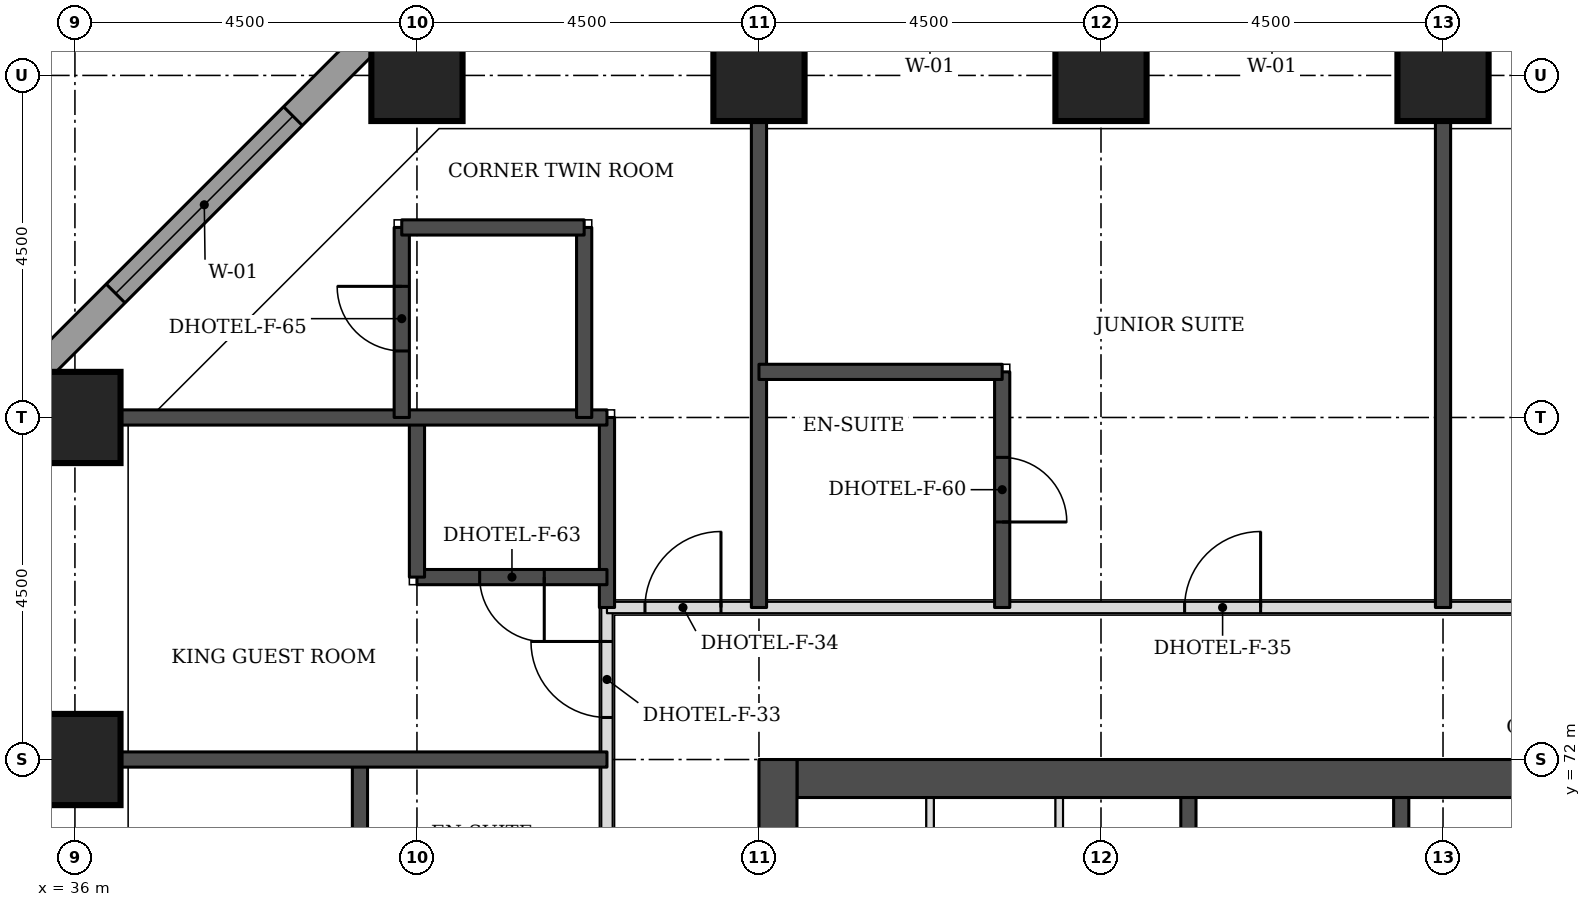
"""IFC4 building model, lengths in metres.
Left out: names, types, materials, properties, quantities, classifications, styles, units other than length and angle.
Written with IfcOpenShell. Run it as: python <this file> out.ifc"""

import sys

from ifc_helpers import new_model, si_unit, direction, frame, frame_2d, origin, origin_2d, place, context, subcontext, project, spatial, rectangle, extrude, element, fill, save


model = new_model("IFC4")
c1 = context("Model", 3, precision=1e-05, world=origin(), true_north=direction((0.0, 1.0)))
c2 = subcontext(c1, "Body", "Model", "MODEL_VIEW")
j1 = project(units=[si_unit("LENGTHUNIT", "METRE"), si_unit("PLANEANGLEUNIT", "RADIAN")], contexts=[c1])
p1 = place(None, origin())
s1 = spatial("IfcSite", under=j1, at=p1, CompositionType="ELEMENT")
p2 = place(p1, origin())
s2 = spatial("IfcBuilding", under=s1, at=p2, CompositionType="ELEMENT")
p3 = place(p2, frame((0.0, 0.0, 42.9)))
s3 = spatial("IfcBuildingStorey", under=s2, at=p3, CompositionType="ELEMENT", Elevation=42.9)
for number, where, z_axis, x_axis in (
    (1, (36.0, 72.0, 0.0), (0.0, 0.0, 1.0), (1.0, 0.0, 0.0)),
    (2, (36.0, 76.5, 0.0), (0.0, 0.0, 1.0), (1.0, 0.0, 0.0)),
    (3, (40.5, 81.0, 0.0), (0.0, 0.0, 1.0), (1.0, 0.0, 0.0)),
    (4, (45.0, 81.0, 0.0), (0.0, 0.0, 1.0), (1.0, 0.0, 0.0)),
    (5, (49.5, 81.0, 0.0), (0.0, 0.0, 1.0), (1.0, 0.0, 0.0)),
    (6, (54.0, 81.0, 0.0), (0.0, 0.0, 1.0), (1.0, 0.0, 0.0)),
):
    element("IfcColumn", number, at=place(p3, frame(where, z_axis=z_axis, x_axis=x_axis)), inside=s3, PredefinedType="COLUMN", context=c2, shape_type="SweptSolid", body=[
        extrude(rectangle(XDim=1.2, YDim=1.2, at=origin_2d()), origin(), (0.0, 0.0, 1.0), 3.3),
    ])
p4 = place(p3, frame((45.5, 71.75, 0.0), z_axis=(0.0, 0.0, 1.0), x_axis=(1.0, 0.0, 0.0)))
e7 = element("IfcWall", 7, at=p4, inside=s3, PredefinedType="SHEAR", context=c2, shape_type="SweptSolid", body=[
    extrude(rectangle(XDim=21.5, YDim=0.5, at=frame_2d((10.75, 0.0))), origin(), (0.0, 0.0, 1.0), 3.3),
])
p5 = place(p3, frame((45.25, 49.5, 0.0), z_axis=(0.0, 0.0, 1.0), x_axis=(0.0, 1.0, 0.0)))
e8 = element("IfcWall", 8, at=p5, inside=s3, PredefinedType="SHEAR", context=c2, shape_type="SweptSolid", body=[
    extrude(rectangle(XDim=22.5, YDim=0.5, at=frame_2d((11.25, 0.0))), origin(), (0.0, 0.0, 1.0), 3.3),
])
p6 = place(p5, frame((4.2, 0.0, 0.0)))
e9 = element("IfcOpeningElement", 9, at=p6, cuts=e8, PredefinedType="OPENING", context=c2, shape_type="SweptSolid", body=[
    extrude(rectangle(XDim=1.8, YDim=2.1, at=frame_2d((0.9, 1.05))), frame((0.0, 0.26, 0.0), z_axis=(0.0, -1.0, 0.0), x_axis=(1.0, 0.0, 0.0)), (0.0, 0.0, 1.0), 0.52),
])
p7 = place(p5, frame((6.9, 0.0, 0.0)))
e10 = element("IfcOpeningElement", 10, at=p7, cuts=e8, PredefinedType="OPENING", context=c2, shape_type="SweptSolid", body=[
    extrude(rectangle(XDim=1.1, YDim=2.1, at=frame_2d((0.55, 1.05))), frame((0.0, 0.26, 0.0), z_axis=(0.0, -1.0, 0.0), x_axis=(1.0, 0.0, 0.0)), (0.0, 0.0, 1.0), 0.52),
])
p8 = place(p5, frame((13.6, 0.0, 0.0)))
e11 = element("IfcOpeningElement", 11, at=p8, cuts=e8, PredefinedType="OPENING", context=c2, shape_type="SweptSolid", body=[
    extrude(rectangle(XDim=1.1, YDim=2.1, at=frame_2d((0.55, 1.05))), frame((0.0, 0.26, 0.0), z_axis=(0.0, -1.0, 0.0), x_axis=(1.0, 0.0, 0.0)), (0.0, 0.0, 1.0), 0.52),
])
p9 = place(p5, frame((16.5, 0.0, 0.0)))
e12 = element("IfcOpeningElement", 12, at=p9, cuts=e8, PredefinedType="OPENING", context=c2, shape_type="SweptSolid", body=[
    extrude(rectangle(XDim=1.8, YDim=2.1, at=frame_2d((0.9, 1.05))), frame((0.0, 0.26, 0.0), z_axis=(0.0, -1.0, 0.0), x_axis=(1.0, 0.0, 0.0)), (0.0, 0.0, 1.0), 0.52),
])
p10 = place(p3, frame((40.23, 81.826, 0.0), z_axis=(0.0, 0.0, 1.0), x_axis=(-0.707106781187, -0.707106781187, 0.0)))
e13 = element("IfcWall", 13, at=p10, inside=s3, PredefinedType="STANDARD", context=c2, shape_type="SweptSolid", body=[
    extrude(rectangle(XDim=7.151, YDim=0.35, at=frame_2d((3.576, 0.0))), origin(), (0.0, 0.0, 1.0), 3.055),
])
p11 = place(p10, frame((1.926, 0.0, 0.8)))
e14 = element("IfcOpeningElement", 14, at=p11, cuts=e13, PredefinedType="OPENING", context=c2, shape_type="SweptSolid", body=[
    extrude(rectangle(XDim=3.3, YDim=1.5, at=frame_2d((1.65, 0.75))), frame((0.0, 0.185, 0.0), z_axis=(0.0, -1.0, 0.0), x_axis=(1.0, 0.0, 0.0)), (0.0, 0.0, 1.0), 0.37),
])
p12 = place(p3, frame((43.0, 57.35, 0.0), z_axis=(0.0, 0.0, 1.0), x_axis=(0.0, 1.0, 0.0)))
e15 = element("IfcWall", 15, at=p12, inside=s3, PredefinedType="PARTITIONING", context=c2, shape_type="SweptSolid", body=[
    extrude(rectangle(XDim=16.65, YDim=0.15, at=frame_2d((8.325, 0.0))), origin(), (0.0, 0.0, 1.0), 3.08),
])
p13 = place(p12, frame((8.45, 0.0, 0.0)))
e16 = element("IfcOpeningElement", 16, at=p13, cuts=e15, PredefinedType="OPENING", context=c2, shape_type="SweptSolid", body=[
    extrude(rectangle(XDim=1.0, YDim=2.1, at=frame_2d((0.5, 1.05))), frame((0.0, 0.085, 0.0), z_axis=(0.0, -1.0, 0.0), x_axis=(1.0, 0.0, 0.0)), (0.0, 0.0, 1.0), 0.17),
])
p14 = place(p12, frame((10.6, 0.0, 0.0)))
e17 = element("IfcOpeningElement", 17, at=p14, cuts=e15, PredefinedType="OPENING", context=c2, shape_type="SweptSolid", body=[
    extrude(rectangle(XDim=1.0, YDim=2.1, at=frame_2d((0.5, 1.05))), frame((0.0, 0.085, 0.0), z_axis=(0.0, -1.0, 0.0), x_axis=(1.0, 0.0, 0.0)), (0.0, 0.0, 1.0), 0.17),
])
p15 = place(p12, frame((15.203, 0.0, 0.0)))
e18 = element("IfcOpeningElement", 18, at=p15, cuts=e15, PredefinedType="OPENING", context=c2, shape_type="SweptSolid", body=[
    extrude(rectangle(XDim=1.0, YDim=2.1, at=frame_2d((0.5, 1.05))), frame((0.0, 0.085, 0.0), z_axis=(0.0, -1.0, 0.0), x_axis=(1.0, 0.0, 0.0)), (0.0, 0.0, 1.0), 0.17),
])
p16 = place(p3, frame((43.0, 74.0, 0.0), z_axis=(0.0, 0.0, 1.0), x_axis=(1.0, 0.0, 0.0)))
e19 = element("IfcWall", 19, at=p16, inside=s3, PredefinedType="PARTITIONING", context=c2, shape_type="SweptSolid", body=[
    extrude(rectangle(XDim=26.5, YDim=0.15, at=frame_2d((13.25, 0.0))), origin(), (0.0, 0.0, 1.0), 3.08),
])
p17 = place(p16, frame((7.6, 0.0, 0.0)))
e20 = element("IfcOpeningElement", 20, at=p17, cuts=e19, PredefinedType="OPENING", context=c2, shape_type="SweptSolid", body=[
    extrude(rectangle(XDim=1.0, YDim=2.1, at=frame_2d((0.5, 1.05))), frame((0.0, 0.085, 0.0), z_axis=(0.0, -1.0, 0.0), x_axis=(1.0, 0.0, 0.0)), (0.0, 0.0, 1.0), 0.17),
])
p18 = place(p16, frame((13.65, 0.0, 0.0)))
e21 = element("IfcOpeningElement", 21, at=p18, cuts=e19, PredefinedType="OPENING", context=c2, shape_type="SweptSolid", body=[
    extrude(rectangle(XDim=1.0, YDim=2.1, at=frame_2d((0.5, 1.05))), frame((0.0, 0.085, 0.0), z_axis=(0.0, -1.0, 0.0), x_axis=(1.0, 0.0, 0.0)), (0.0, 0.0, 1.0), 0.17),
])
p19 = place(p16, frame((23.05, 0.0, 0.0)))
e22 = element("IfcOpeningElement", 22, at=p19, cuts=e19, PredefinedType="OPENING", context=c2, shape_type="SweptSolid", body=[
    extrude(rectangle(XDim=1.0, YDim=2.1, at=frame_2d((0.5, 1.05))), frame((0.0, 0.085, 0.0), z_axis=(0.0, -1.0, 0.0), x_axis=(1.0, 0.0, 0.0)), (0.0, 0.0, 1.0), 0.17),
])
p20 = place(p16, frame((0.5, 0.0, 0.0)))
e23 = element("IfcOpeningElement", 23, at=p20, cuts=e19, PredefinedType="OPENING", context=c2, shape_type="SweptSolid", body=[
    extrude(rectangle(XDim=1.0, YDim=2.1, at=frame_2d((0.5, 1.05))), frame((0.0, 0.085, 0.0), z_axis=(0.0, -1.0, 0.0), x_axis=(1.0, 0.0, 0.0)), (0.0, 0.0, 1.0), 0.17),
])
p21 = place(p16, frame((25.0, 0.0, 0.0)))
e24 = element("IfcOpeningElement", 24, at=p21, cuts=e19, PredefinedType="OPENING", context=c2, shape_type="SweptSolid", body=[
    extrude(rectangle(XDim=1.0, YDim=2.1, at=frame_2d((0.5, 1.05))), frame((0.0, 0.085, 0.0), z_axis=(0.0, -1.0, 0.0), x_axis=(1.0, 0.0, 0.0)), (0.0, 0.0, 1.0), 0.17),
])
p22 = place(p3, frame((39.75, 69.4, 0.0), z_axis=(0.0, 0.0, 1.0), x_axis=(0.0, 1.0, 0.0)))
e25 = element("IfcWall", 25, at=p22, inside=s3, PredefinedType="SOLIDWALL", context=c2, shape_type="SweptSolid", body=[
    extrude(rectangle(XDim=2.6, YDim=0.2, at=frame_2d((1.3, 0.0))), origin(), (0.0, 0.0, 1.0), 3.08),
])
p23 = place(p3, frame((36.6, 72.0, 0.0), z_axis=(0.0, 0.0, 1.0), x_axis=(1.0, 0.0, 0.0)))
e26 = element("IfcWall", 26, at=p23, inside=s3, PredefinedType="SOLIDWALL", context=c2, shape_type="SweptSolid", body=[
    extrude(rectangle(XDim=6.4, YDim=0.2, at=frame_2d((3.2, 0.0))), origin(), (0.0, 0.0, 1.0), 3.08),
])
p24 = place(p3, frame((43.0, 74.0, 0.0), z_axis=(0.0, 0.0, 1.0), x_axis=(0.0, 1.0, 0.0)))
e27 = element("IfcWall", 27, at=p24, inside=s3, PredefinedType="SOLIDWALL", context=c2, shape_type="SweptSolid", body=[
    extrude(rectangle(XDim=2.5, YDim=0.2, at=frame_2d((1.25, 0.0))), origin(), (0.0, 0.0, 1.0), 3.08),
])
p25 = place(p3, frame((45.0, 74.0, 0.0), z_axis=(0.0, 0.0, 1.0), x_axis=(0.0, 1.0, 0.0)))
e28 = element("IfcWall", 28, at=p25, inside=s3, PredefinedType="SOLIDWALL", context=c2, shape_type="SweptSolid", body=[
    extrude(rectangle(XDim=6.4, YDim=0.2, at=frame_2d((3.2, 0.0))), origin(), (0.0, 0.0, 1.0), 3.08),
])
p26 = place(p3, frame((48.2, 74.0, 0.0), z_axis=(0.0, 0.0, 1.0), x_axis=(0.0, 1.0, 0.0)))
e29 = element("IfcWall", 29, at=p26, inside=s3, PredefinedType="SOLIDWALL", context=c2, shape_type="SweptSolid", body=[
    extrude(rectangle(XDim=3.1, YDim=0.2, at=frame_2d((1.55, 0.0))), origin(), (0.0, 0.0, 1.0), 3.08),
])
p27 = place(p26, frame((1.125, 0.0, 0.0)))
e30 = element("IfcOpeningElement", 30, at=p27, cuts=e29, PredefinedType="OPENING", context=c2, shape_type="SweptSolid", body=[
    extrude(rectangle(XDim=0.85, YDim=2.1, at=frame_2d((0.425, 1.05))), frame((0.0, 0.11, 0.0), z_axis=(0.0, -1.0, 0.0), x_axis=(1.0, 0.0, 0.0)), (0.0, 0.0, 1.0), 0.22),
])
p28 = place(p3, frame((54.0, 74.0, 0.0), z_axis=(0.0, 0.0, 1.0), x_axis=(0.0, 1.0, 0.0)))
e31 = element("IfcWall", 31, at=p28, inside=s3, PredefinedType="SOLIDWALL", context=c2, shape_type="SweptSolid", body=[
    extrude(rectangle(XDim=6.4, YDim=0.2, at=frame_2d((3.2, 0.0))), origin(), (0.0, 0.0, 1.0), 3.08),
])
p29 = place(p3, frame((40.5, 74.4, 0.0), z_axis=(0.0, 0.0, 1.0), x_axis=(1.0, 0.0, 0.0)))
e32 = element("IfcWall", 32, at=p29, inside=s3, PredefinedType="SOLIDWALL", context=c2, shape_type="SweptSolid", body=[
    extrude(rectangle(XDim=2.5, YDim=0.2, at=frame_2d((1.25, 0.0))), origin(), (0.0, 0.0, 1.0), 3.08),
])
p30 = place(p29, frame((0.825, 0.0, 0.0)))
e33 = element("IfcOpeningElement", 33, at=p30, cuts=e32, PredefinedType="OPENING", context=c2, shape_type="SweptSolid", body=[
    extrude(rectangle(XDim=0.85, YDim=2.1, at=frame_2d((0.425, 1.05))), frame((0.0, 0.11, 0.0), z_axis=(0.0, -1.0, 0.0), x_axis=(1.0, 0.0, 0.0)), (0.0, 0.0, 1.0), 0.22),
])
p31 = place(p3, frame((40.5, 74.4, 0.0), z_axis=(0.0, 0.0, 1.0), x_axis=(0.0, 1.0, 0.0)))
e34 = element("IfcWall", 34, at=p31, inside=s3, PredefinedType="SOLIDWALL", context=c2, shape_type="SweptSolid", body=[
    extrude(rectangle(XDim=2.1, YDim=0.2, at=frame_2d((1.05, 0.0))), origin(), (0.0, 0.0, 1.0), 3.08),
])
p32 = place(p3, frame((36.6, 76.5, 0.0), z_axis=(0.0, 0.0, 1.0), x_axis=(1.0, 0.0, 0.0)))
e35 = element("IfcWall", 35, at=p32, inside=s3, PredefinedType="SOLIDWALL", context=c2, shape_type="SweptSolid", body=[
    extrude(rectangle(XDim=6.4, YDim=0.2, at=frame_2d((3.2, 0.0))), origin(), (0.0, 0.0, 1.0), 3.08),
])
p33 = place(p3, frame((40.3, 76.5, 0.0), z_axis=(0.0, 0.0, 1.0), x_axis=(0.0, 1.0, 0.0)))
e36 = element("IfcWall", 36, at=p33, inside=s3, PredefinedType="SOLIDWALL", context=c2, shape_type="SweptSolid", body=[
    extrude(rectangle(XDim=2.5, YDim=0.2, at=frame_2d((1.25, 0.0))), origin(), (0.0, 0.0, 1.0), 3.08),
])
p34 = place(p33, frame((0.875, 0.0, 0.0)))
e37 = element("IfcOpeningElement", 37, at=p34, cuts=e36, PredefinedType="OPENING", context=c2, shape_type="SweptSolid", body=[
    extrude(rectangle(XDim=0.85, YDim=2.1, at=frame_2d((0.425, 1.05))), frame((0.0, 0.11, 0.0), z_axis=(0.0, -1.0, 0.0), x_axis=(1.0, 0.0, 0.0)), (0.0, 0.0, 1.0), 0.22),
])
p35 = place(p3, frame((42.7, 76.5, 0.0), z_axis=(0.0, 0.0, 1.0), x_axis=(0.0, 1.0, 0.0)))
e38 = element("IfcWall", 38, at=p35, inside=s3, PredefinedType="SOLIDWALL", context=c2, shape_type="SweptSolid", body=[
    extrude(rectangle(XDim=2.5, YDim=0.2, at=frame_2d((1.25, 0.0))), origin(), (0.0, 0.0, 1.0), 3.08),
])
p36 = place(p3, frame((45.0, 77.1, 0.0), z_axis=(0.0, 0.0, 1.0), x_axis=(1.0, 0.0, 0.0)))
e39 = element("IfcWall", 39, at=p36, inside=s3, PredefinedType="SOLIDWALL", context=c2, shape_type="SweptSolid", body=[
    extrude(rectangle(XDim=3.2, YDim=0.2, at=frame_2d((1.6, 0.0))), origin(), (0.0, 0.0, 1.0), 3.08),
])
p37 = place(p3, frame((40.3, 79.0, 0.0), z_axis=(0.0, 0.0, 1.0), x_axis=(1.0, 0.0, 0.0)))
e40 = element("IfcWall", 40, at=p37, inside=s3, PredefinedType="SOLIDWALL", context=c2, shape_type="SweptSolid", body=[
    extrude(rectangle(XDim=2.4, YDim=0.2, at=frame_2d((1.2, 0.0))), origin(), (0.0, 0.0, 1.0), 3.08),
])
for number, where, z_axis, x_axis in (
    (41, (47.251, 68.5, 0.0), (0.0, 0.0, 1.0), (0.0, 1.0, 0.0)),
    (42, (48.95, 68.5, 0.0), (0.0, 0.0, 1.0), (0.0, 1.0, 0.0)),
):
    element("IfcWall", number, at=place(p3, frame(where, z_axis=z_axis, x_axis=x_axis)), inside=s3, PredefinedType="PARTITIONING", context=c2, shape_type="SweptSolid", body=[
        extrude(rectangle(XDim=3.0, YDim=0.1, at=frame_2d((1.5, 0.0))), origin(), (0.0, 0.0, 1.0), 3.08),
    ])
for number, where, z_axis, x_axis in (
    (43, (50.65, 68.5, 0.0), (0.0, 0.0, 1.0), (0.0, 1.0, 0.0)),
    (44, (53.45, 68.5, 0.0), (0.0, 0.0, 1.0), (0.0, 1.0, 0.0)),
):
    element("IfcWall", number, at=place(p3, frame(where, z_axis=z_axis, x_axis=x_axis)), inside=s3, PredefinedType="SOLIDWALL", context=c2, shape_type="SweptSolid", body=[
        extrude(rectangle(XDim=3.0, YDim=0.2, at=frame_2d((1.5, 0.0))), origin(), (0.0, 0.0, 1.0), 3.08),
    ])
p38 = place(p11, origin())
e45 = element("IfcWindow", 45, at=p38, inside=s3, PartitioningType="SINGLE_PANEL", PredefinedType="WINDOW", context=c2, shape_type="SweptSolid", body=[
    extrude(rectangle(XDim=3.3, YDim=1.5, at=frame_2d((1.65, 0.75))), frame((0.0, 0.085, 0.0), z_axis=(0.0, -1.0, 0.0), x_axis=(1.0, 0.0, 0.0)), (0.0, 0.0, 1.0), 0.06),
])
fill(e14, e45)
p39 = place(p15, origin())
e46 = element("IfcDoor", 46, at=p39, inside=s3, OperationType="SINGLE_SWING_RIGHT", PredefinedType="DOOR", context=c2, shape_type="SweptSolid", body=[
    extrude(rectangle(XDim=1.0, YDim=2.1, at=frame_2d((0.5, 1.05))), frame((0.0, 0.025, 0.0), z_axis=(0.0, -1.0, 0.0), x_axis=(1.0, 0.0, 0.0)), (0.0, 0.0, 1.0), 0.05),
])
fill(e18, e46)
p40 = place(p30, frame((0.85, 0.0, 0.0), z_axis=(0.0, 0.0, 1.0), x_axis=(-1.0, 0.0, 0.0)))
e47 = element("IfcDoor", 47, at=p40, inside=s3, OperationType="SINGLE_SWING_LEFT", PredefinedType="DOOR", context=c2, shape_type="SweptSolid", body=[
    extrude(rectangle(XDim=0.85, YDim=2.1, at=frame_2d((0.425, 1.05))), frame((0.0, 0.025, 0.0), z_axis=(0.0, -1.0, 0.0), x_axis=(1.0, 0.0, 0.0)), (0.0, 0.0, 1.0), 0.05),
])
fill(e33, e47)
p41 = place(p17, origin())
e48 = element("IfcDoor", 48, at=p41, inside=s3, OperationType="SINGLE_SWING_RIGHT", PredefinedType="DOOR", context=c2, shape_type="SweptSolid", body=[
    extrude(rectangle(XDim=1.0, YDim=2.1, at=frame_2d((0.5, 1.05))), frame((0.0, 0.025, 0.0), z_axis=(0.0, -1.0, 0.0), x_axis=(1.0, 0.0, 0.0)), (0.0, 0.0, 1.0), 0.05),
])
fill(e20, e48)
p42 = place(p27, frame((0.85, 0.0, 0.0), z_axis=(0.0, 0.0, 1.0), x_axis=(-1.0, 0.0, 0.0)))
e49 = element("IfcDoor", 49, at=p42, inside=s3, OperationType="SINGLE_SWING_RIGHT", PredefinedType="DOOR", context=c2, shape_type="SweptSolid", body=[
    extrude(rectangle(XDim=0.85, YDim=2.1, at=frame_2d((0.425, 1.05))), frame((0.0, 0.025, 0.0), z_axis=(0.0, -1.0, 0.0), x_axis=(1.0, 0.0, 0.0)), (0.0, 0.0, 1.0), 0.05),
])
fill(e30, e49)
p43 = place(p20, origin())
e50 = element("IfcDoor", 50, at=p43, inside=s3, OperationType="SINGLE_SWING_RIGHT", PredefinedType="DOOR", context=c2, shape_type="SweptSolid", body=[
    extrude(rectangle(XDim=1.0, YDim=2.1, at=frame_2d((0.5, 1.05))), frame((0.0, 0.025, 0.0), z_axis=(0.0, -1.0, 0.0), x_axis=(1.0, 0.0, 0.0)), (0.0, 0.0, 1.0), 0.05),
])
fill(e23, e50)
p44 = place(p34, origin())
e51 = element("IfcDoor", 51, at=p44, inside=s3, OperationType="SINGLE_SWING_RIGHT", PredefinedType="DOOR", context=c2, shape_type="SweptSolid", body=[
    extrude(rectangle(XDim=0.85, YDim=2.1, at=frame_2d((0.425, 1.05))), frame((0.0, 0.025, 0.0), z_axis=(0.0, -1.0, 0.0), x_axis=(1.0, 0.0, 0.0)), (0.0, 0.0, 1.0), 0.05),
])
fill(e37, e51)
save(model, sys.argv[1])
